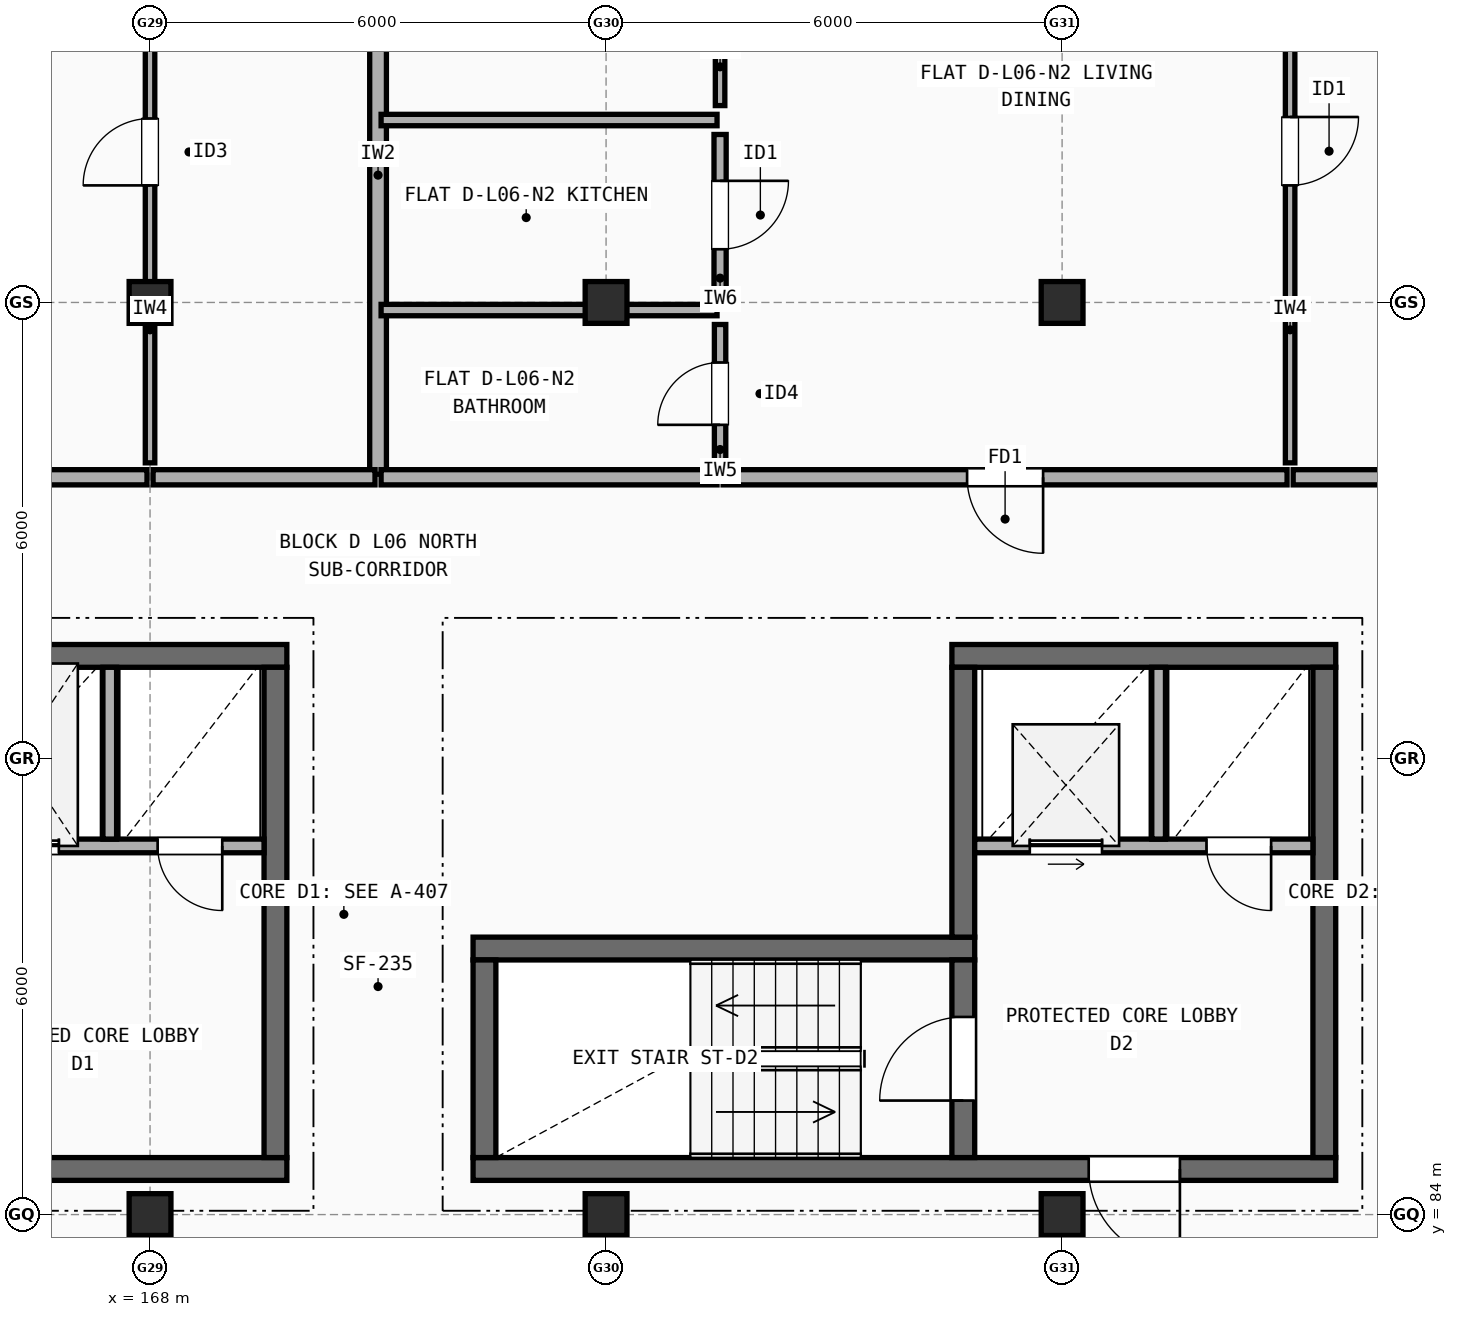
"""IFC4 building model, lengths in metres.
Left out: names, types, materials, properties, quantities, classifications, styles, units other than length and angle.
Written with IfcOpenShell. Run it as: python <this file> out.ifc"""

import sys

from ifc_helpers import new_model, si_unit, direction, frame, frame_2d, origin, origin_2d, place, context, subcontext, project, spatial, rectangle, extrude, element, fill, save


model = new_model("IFC4")
c1 = context("Model", 3, precision=1e-05, world=origin(), true_north=direction((0.0, 1.0)))
c2 = subcontext(c1, "Body", "Model", "MODEL_VIEW")
j1 = project(units=[si_unit("LENGTHUNIT", "METRE"), si_unit("PLANEANGLEUNIT", "RADIAN")], contexts=[c1])
p1 = place(None, origin())
s1 = spatial("IfcSite", under=j1, at=p1, CompositionType="ELEMENT")
p2 = place(p1, origin())
s2 = spatial("IfcBuilding", under=s1, at=p2, CompositionType="ELEMENT")
p3 = place(p2, frame((0.0, 0.0, 20.5)))
s3 = spatial("IfcBuildingStorey", under=s2, at=p3, CompositionType="ELEMENT", Elevation=20.5)
for number, where, z_axis, x_axis in (
    (1, (168.0, 84.0, 0.0), (0.0, 0.0, 1.0), (1.0, 0.0, 0.0)),
    (2, (168.0, 96.0, 0.0), (0.0, 0.0, 1.0), (1.0, 0.0, 0.0)),
    (3, (174.0, 84.0, 0.0), (0.0, 0.0, 1.0), (1.0, 0.0, 0.0)),
    (4, (174.0, 96.0, 0.0), (0.0, 0.0, 1.0), (1.0, 0.0, 0.0)),
    (5, (180.0, 84.0, 0.0), (0.0, 0.0, 1.0), (1.0, 0.0, 0.0)),
    (6, (180.0, 96.0, 0.0), (0.0, 0.0, 1.0), (1.0, 0.0, 0.0)),
):
    element("IfcColumn", number, at=place(p3, frame(where, z_axis=z_axis, x_axis=x_axis)), inside=s3, PredefinedType="COLUMN", context=c2, shape_type="SweptSolid", body=[
        extrude(rectangle(XDim=0.55, YDim=0.55, at=origin_2d()), origin(), (0.0, 0.0, 1.0), 2.97),
    ])
p4 = place(p3, frame((158.45, 84.6, 0.0), z_axis=(0.0, 0.0, 1.0), x_axis=(1.0, 0.0, 0.0)))
e7 = element("IfcWall", 7, at=p4, inside=s3, PredefinedType="SHEAR", context=c2, shape_type="SweptSolid", body=[
    extrude(rectangle(XDim=11.35, YDim=0.3, at=frame_2d((5.675, 0.0))), origin(), (0.0, 0.0, 1.0), 2.97),
])
p5 = place(p4, frame((5.1, 0.0, 0.0)))
e8 = element("IfcOpeningElement", 8, at=p5, cuts=e7, PredefinedType="OPENING", context=c2, shape_type="SweptSolid", body=[
    extrude(rectangle(XDim=1.15, YDim=2.15, at=frame_2d((0.575, 1.075))), frame((0.0, 0.16, 0.0), z_axis=(0.0, -1.0, 0.0), x_axis=(1.0, 0.0, 0.0)), (0.0, 0.0, 1.0), 0.32),
])
p6 = place(p3, frame((169.8, 91.35, 0.0), z_axis=(0.0, 0.0, 1.0), x_axis=(-1.0, 0.0, 0.0)))
e9 = element("IfcWall", 9, at=p6, inside=s3, PredefinedType="SHEAR", context=c2, shape_type="SweptSolid", body=[
    extrude(rectangle(XDim=5.05, YDim=0.3, at=frame_2d((2.525, 0.0))), origin(), (0.0, 0.0, 1.0), 2.97),
])
p7 = place(p3, frame((169.65, 84.75, 0.0), z_axis=(0.0, 0.0, 1.0), x_axis=(0.0, 1.0, 0.0)))
e10 = element("IfcWall", 10, at=p7, inside=s3, PredefinedType="SHEAR", context=c2, shape_type="SweptSolid", body=[
    extrude(rectangle(XDim=6.45, YDim=0.3, at=frame_2d((3.225, 0.0))), origin(), (0.0, 0.0, 1.0), 2.97),
])
p8 = place(p3, frame((165.05, 88.85, 0.0), z_axis=(0.0, 0.0, 1.0), x_axis=(1.0, 0.0, 0.0)))
e11 = element("IfcWall", 11, at=p8, inside=s3, PredefinedType="SOLIDWALL", context=c2, shape_type="SweptSolid", body=[
    extrude(rectangle(XDim=4.45, YDim=0.18, at=frame_2d((2.225, 0.0))), origin(), (0.0, 0.0, 1.0), 2.97),
])
p9 = place(p8, frame((0.65, 0.0, 0.0)))
e12 = element("IfcOpeningElement", 12, at=p9, cuts=e11, PredefinedType="OPENING", context=c2, shape_type="SweptSolid", body=[
    extrude(rectangle(XDim=1.1, YDim=2.15, at=frame_2d((0.55, 1.075))), frame((0.0, 0.1, 0.0), z_axis=(0.0, -1.0, 0.0), x_axis=(1.0, 0.0, 0.0)), (0.0, 0.0, 1.0), 0.2),
])
p10 = place(p8, frame((3.05, 0.0, 0.0)))
e13 = element("IfcOpeningElement", 13, at=p10, cuts=e11, PredefinedType="OPENING", context=c2, shape_type="SweptSolid", body=[
    extrude(rectangle(XDim=0.85, YDim=2.1, at=frame_2d((0.425, 1.05))), frame((0.0, 0.1, 0.0), z_axis=(0.0, -1.0, 0.0), x_axis=(1.0, 0.0, 0.0)), (0.0, 0.0, 1.0), 0.2),
])
p11 = place(p3, frame((167.47, 88.94, 0.0), z_axis=(0.0, 0.0, 1.0), x_axis=(0.0, 1.0, 0.0)))
e14 = element("IfcWall", 14, at=p11, inside=s3, PredefinedType="SOLIDWALL", context=c2, shape_type="SweptSolid", body=[
    extrude(rectangle(XDim=2.26, YDim=0.18, at=frame_2d((1.13, 0.0))), origin(), (0.0, 0.0, 1.0), 2.97),
])
p12 = place(p3, frame((172.25, 84.6, 0.0), z_axis=(0.0, 0.0, 1.0), x_axis=(1.0, 0.0, 0.0)))
e15 = element("IfcWall", 15, at=p12, inside=s3, PredefinedType="SHEAR", context=c2, shape_type="SweptSolid", body=[
    extrude(rectangle(XDim=11.35, YDim=0.3, at=frame_2d((5.675, 0.0))), origin(), (0.0, 0.0, 1.0), 2.97),
])
p13 = place(p12, frame((8.1, 0.0, 0.0)))
e16 = element("IfcOpeningElement", 16, at=p13, cuts=e15, PredefinedType="OPENING", context=c2, shape_type="SweptSolid", body=[
    extrude(rectangle(XDim=1.2, YDim=2.15, at=frame_2d((0.6, 1.075))), frame((0.0, 0.16, 0.0), z_axis=(0.0, -1.0, 0.0), x_axis=(1.0, 0.0, 0.0)), (0.0, 0.0, 1.0), 0.32),
])
p14 = place(p3, frame((178.85, 87.5, 0.0), z_axis=(0.0, 0.0, 1.0), x_axis=(-1.0, 0.0, 0.0)))
e17 = element("IfcWall", 17, at=p14, inside=s3, PredefinedType="SHEAR", context=c2, shape_type="SweptSolid", body=[
    extrude(rectangle(XDim=6.6, YDim=0.3, at=frame_2d((3.3, 0.0))), origin(), (0.0, 0.0, 1.0), 2.97),
])
p15 = place(p3, frame((172.4, 87.35, 0.0), z_axis=(0.0, 0.0, 1.0), x_axis=(0.0, -1.0, 0.0)))
e18 = element("IfcWall", 18, at=p15, inside=s3, PredefinedType="SHEAR", context=c2, shape_type="SweptSolid", body=[
    extrude(rectangle(XDim=2.6, YDim=0.3, at=frame_2d((1.3, 0.0))), origin(), (0.0, 0.0, 1.0), 2.97),
])
p16 = place(p3, frame((178.7, 84.75, 0.0), z_axis=(0.0, 0.0, 1.0), x_axis=(0.0, 1.0, 0.0)))
e19 = element("IfcWall", 19, at=p16, inside=s3, PredefinedType="SHEAR", context=c2, shape_type="SweptSolid", body=[
    extrude(rectangle(XDim=2.6, YDim=0.3, at=frame_2d((1.3, 0.0))), origin(), (0.0, 0.0, 1.0), 2.97),
])
p17 = place(p16, frame((0.75, 0.0, 0.0)))
e20 = element("IfcOpeningElement", 20, at=p17, cuts=e19, PredefinedType="OPENING", context=c2, shape_type="SweptSolid", body=[
    extrude(rectangle(XDim=1.1, YDim=2.15, at=frame_2d((0.55, 1.075))), frame((0.0, 0.16, 0.0), z_axis=(0.0, -1.0, 0.0), x_axis=(1.0, 0.0, 0.0)), (0.0, 0.0, 1.0), 0.32),
])
p18 = place(p3, frame((183.6, 91.35, 0.0), z_axis=(0.0, 0.0, 1.0), x_axis=(-1.0, 0.0, 0.0)))
e21 = element("IfcWall", 21, at=p18, inside=s3, PredefinedType="SHEAR", context=c2, shape_type="SweptSolid", body=[
    extrude(rectangle(XDim=5.05, YDim=0.3, at=frame_2d((2.525, 0.0))), origin(), (0.0, 0.0, 1.0), 2.97),
])
p19 = place(p3, frame((183.45, 84.75, 0.0), z_axis=(0.0, 0.0, 1.0), x_axis=(0.0, 1.0, 0.0)))
e22 = element("IfcWall", 22, at=p19, inside=s3, PredefinedType="SHEAR", context=c2, shape_type="SweptSolid", body=[
    extrude(rectangle(XDim=6.45, YDim=0.3, at=frame_2d((3.225, 0.0))), origin(), (0.0, 0.0, 1.0), 2.97),
])
p20 = place(p3, frame((178.7, 87.65, 0.0), z_axis=(0.0, 0.0, 1.0), x_axis=(0.0, 1.0, 0.0)))
e23 = element("IfcWall", 23, at=p20, inside=s3, PredefinedType="SHEAR", context=c2, shape_type="SweptSolid", body=[
    extrude(rectangle(XDim=3.55, YDim=0.3, at=frame_2d((1.775, 0.0))), origin(), (0.0, 0.0, 1.0), 2.97),
])
p21 = place(p3, frame((178.85, 88.85, 0.0), z_axis=(0.0, 0.0, 1.0), x_axis=(1.0, 0.0, 0.0)))
e24 = element("IfcWall", 24, at=p21, inside=s3, PredefinedType="SOLIDWALL", context=c2, shape_type="SweptSolid", body=[
    extrude(rectangle(XDim=4.45, YDim=0.18, at=frame_2d((2.225, 0.0))), origin(), (0.0, 0.0, 1.0), 2.97),
])
p22 = place(p21, frame((0.725, 0.0, 0.0)))
e25 = element("IfcOpeningElement", 25, at=p22, cuts=e24, PredefinedType="OPENING", context=c2, shape_type="SweptSolid", body=[
    extrude(rectangle(XDim=0.95, YDim=2.15, at=frame_2d((0.475, 1.075))), frame((0.0, 0.1, 0.0), z_axis=(0.0, -1.0, 0.0), x_axis=(1.0, 0.0, 0.0)), (0.0, 0.0, 1.0), 0.2),
])
p23 = place(p21, frame((3.05, 0.0, 0.0)))
e26 = element("IfcOpeningElement", 26, at=p23, cuts=e24, PredefinedType="OPENING", context=c2, shape_type="SweptSolid", body=[
    extrude(rectangle(XDim=0.85, YDim=2.1, at=frame_2d((0.425, 1.05))), frame((0.0, 0.1, 0.0), z_axis=(0.0, -1.0, 0.0), x_axis=(1.0, 0.0, 0.0)), (0.0, 0.0, 1.0), 0.2),
])
p24 = place(p3, frame((181.27, 88.94, 0.0), z_axis=(0.0, 0.0, 1.0), x_axis=(0.0, 1.0, 0.0)))
e27 = element("IfcWall", 27, at=p24, inside=s3, PredefinedType="SOLIDWALL", context=c2, shape_type="SweptSolid", body=[
    extrude(rectangle(XDim=2.26, YDim=0.18, at=frame_2d((1.13, 0.0))), origin(), (0.0, 0.0, 1.0), 2.97),
])
p25 = place(p3, frame((171.0, 93.74, 0.0), z_axis=(0.0, 0.0, 1.0), x_axis=(0.0, 1.0, 0.0)))
e28 = element("IfcWall", 28, at=p25, inside=s3, PredefinedType="SOLIDWALL", context=c2, shape_type="SweptSolid", body=[
    extrude(rectangle(XDim=7.87, YDim=0.22, at=frame_2d((3.935, 0.0))), origin(), (0.0, 0.0, 1.0), 2.508),
])
p26 = place(p3, frame((160.54, 93.7, 0.0), z_axis=(0.0, 0.0, 1.0), x_axis=(1.0, 0.0, 0.0)))
e29 = element("IfcWall", 29, at=p26, inside=s3, PredefinedType="SOLIDWALL", context=c2, shape_type="SweptSolid", body=[
    extrude(rectangle(XDim=7.42, YDim=0.2, at=frame_2d((3.71, 0.0))), origin(), (0.0, 0.0, 1.0), 2.508),
])
p27 = place(p26, frame((3.22, 0.0, 0.0)))
e30 = element("IfcOpeningElement", 30, at=p27, cuts=e29, PredefinedType="OPENING", context=c2, shape_type="SweptSolid", body=[
    extrude(rectangle(XDim=0.98, YDim=2.15, at=frame_2d((0.49, 1.075))), frame((0.0, 0.11, 0.0), z_axis=(0.0, -1.0, 0.0), x_axis=(1.0, 0.0, 0.0)), (0.0, 0.0, 1.0), 0.22),
])
p28 = place(p3, frame((168.04, 93.7, 0.0), z_axis=(0.0, 0.0, 1.0), x_axis=(1.0, 0.0, 0.0)))
e31 = element("IfcWall", 31, at=p28, inside=s3, PredefinedType="SOLIDWALL", context=c2, shape_type="SweptSolid", body=[
    extrude(rectangle(XDim=2.92, YDim=0.2, at=frame_2d((1.46, 0.0))), origin(), (0.0, 0.0, 1.0), 2.508),
])
p29 = place(p3, frame((168.0, 93.89, 0.0), z_axis=(0.0, 0.0, 1.0), x_axis=(0.0, 1.0, 0.0)))
e32 = element("IfcWall", 32, at=p29, inside=s3, PredefinedType="PARTITIONING", context=c2, shape_type="SweptSolid", body=[
    extrude(rectangle(XDim=7.6, YDim=0.125, at=frame_2d((3.8, 0.0))), origin(), (0.0, 0.0, 1.0), 2.508),
])
p30 = place(p29, frame((3.65, 0.0, 0.0)))
e33 = element("IfcOpeningElement", 33, at=p30, cuts=e32, PredefinedType="OPENING", context=c2, shape_type="SweptSolid", body=[
    extrude(rectangle(XDim=0.88, YDim=2.1, at=frame_2d((0.44, 1.05))), frame((0.0, 0.073, 0.0), z_axis=(0.0, -1.0, 0.0), x_axis=(1.0, 0.0, 0.0)), (0.0, 0.0, 1.0), 0.145),
])
p31 = place(p3, frame((171.04, 93.7, 0.0), z_axis=(0.0, 0.0, 1.0), x_axis=(1.0, 0.0, 0.0)))
e34 = element("IfcWall", 34, at=p31, inside=s3, PredefinedType="SOLIDWALL", context=c2, shape_type="SweptSolid", body=[
    extrude(rectangle(XDim=4.42, YDim=0.2, at=frame_2d((2.21, 0.0))), origin(), (0.0, 0.0, 1.0), 2.97),
])
p32 = place(p3, frame((175.54, 93.7, 0.0), z_axis=(0.0, 0.0, 1.0), x_axis=(1.0, 0.0, 0.0)))
e35 = element("IfcWall", 35, at=p32, inside=s3, PredefinedType="SOLIDWALL", context=c2, shape_type="SweptSolid", body=[
    extrude(rectangle(XDim=7.42, YDim=0.2, at=frame_2d((3.71, 0.0))), origin(), (0.0, 0.0, 1.0), 2.97),
])
p33 = place(p32, frame((3.21, 0.0, 0.0)))
e36 = element("IfcOpeningElement", 36, at=p33, cuts=e35, PredefinedType="OPENING", context=c2, shape_type="SweptSolid", body=[
    extrude(rectangle(XDim=1.0, YDim=2.15, at=frame_2d((0.5, 1.075))), frame((0.0, 0.11, 0.0), z_axis=(0.0, -1.0, 0.0), x_axis=(1.0, 0.0, 0.0)), (0.0, 0.0, 1.0), 0.22),
])
p34 = place(p3, frame((175.5, 98.59, 0.0), z_axis=(0.0, 0.0, 1.0), x_axis=(0.0, 1.0, 0.0)))
e37 = element("IfcWall", 37, at=p34, inside=s3, PredefinedType="PARTITIONING", context=c2, shape_type="SweptSolid", body=[
    extrude(rectangle(XDim=3.22, YDim=0.125, at=frame_2d((1.61, 0.0))), origin(), (0.0, 0.0, 1.0), 2.97),
])
p35 = place(p34, frame((1.17, 0.0, 0.0)))
e38 = element("IfcOpeningElement", 38, at=p35, cuts=e37, PredefinedType="OPENING", context=c2, shape_type="SweptSolid", body=[
    extrude(rectangle(XDim=0.88, YDim=2.1, at=frame_2d((0.44, 1.05))), frame((0.0, 0.073, 0.0), z_axis=(0.0, -1.0, 0.0), x_axis=(1.0, 0.0, 0.0)), (0.0, 0.0, 1.0), 0.145),
])
p36 = place(p3, frame((175.5, 96.09, 0.0), z_axis=(0.0, 0.0, 1.0), x_axis=(0.0, 1.0, 0.0)))
e39 = element("IfcWall", 39, at=p36, inside=s3, PredefinedType="PLUMBINGWALL", context=c2, shape_type="SweptSolid", body=[
    extrude(rectangle(XDim=2.12, YDim=0.16, at=frame_2d((1.06, 0.0))), origin(), (0.0, 0.0, 1.0), 2.408),
])
p37 = place(p36, frame((0.61, 0.0, 0.0)))
e40 = element("IfcOpeningElement", 40, at=p37, cuts=e39, PredefinedType="OPENING", context=c2, shape_type="SweptSolid", body=[
    extrude(rectangle(XDim=0.9, YDim=2.1, at=frame_2d((0.45, 1.05))), frame((0.0, 0.09, 0.0), z_axis=(0.0, -1.0, 0.0), x_axis=(1.0, 0.0, 0.0)), (0.0, 0.0, 1.0), 0.18),
])
p38 = place(p3, frame((175.5, 93.89, 0.0), z_axis=(0.0, 0.0, 1.0), x_axis=(0.0, 1.0, 0.0)))
e41 = element("IfcWall", 41, at=p38, inside=s3, PredefinedType="PARTITIONING", context=c2, shape_type="SweptSolid", body=[
    extrude(rectangle(XDim=1.82, YDim=0.15, at=frame_2d((0.91, 0.0))), origin(), (0.0, 0.0, 1.0), 2.97),
])
p39 = place(p38, frame((0.5, 0.0, 0.0)))
e42 = element("IfcOpeningElement", 42, at=p39, cuts=e41, PredefinedType="OPENING", context=c2, shape_type="SweptSolid", body=[
    extrude(rectangle(XDim=0.82, YDim=2.08, at=frame_2d((0.41, 1.04))), frame((0.0, 0.085, 0.0), z_axis=(0.0, -1.0, 0.0), x_axis=(1.0, 0.0, 0.0)), (0.0, 0.0, 1.0), 0.17),
])
p40 = place(p3, frame((171.04, 98.4, 0.0), z_axis=(0.0, 0.0, 1.0), x_axis=(1.0, 0.0, 0.0)))
e43 = element("IfcWall", 43, at=p40, inside=s3, PredefinedType="PARTITIONING", context=c2, shape_type="SweptSolid", body=[
    extrude(rectangle(XDim=4.42, YDim=0.15, at=frame_2d((2.21, 0.0))), origin(), (0.0, 0.0, 1.0), 2.508),
])
p41 = place(p3, frame((171.04, 95.9, 0.0), z_axis=(0.0, 0.0, 1.0), x_axis=(1.0, 0.0, 0.0)))
e44 = element("IfcWall", 44, at=p41, inside=s3, PredefinedType="PARTITIONING", context=c2, shape_type="SweptSolid", body=[
    extrude(rectangle(XDim=4.42, YDim=0.15, at=frame_2d((2.21, 0.0))), origin(), (0.0, 0.0, 1.0), 2.408),
])
p42 = place(p3, frame((183.04, 93.7, 0.0), z_axis=(0.0, 0.0, 1.0), x_axis=(1.0, 0.0, 0.0)))
e45 = element("IfcWall", 45, at=p42, inside=s3, PredefinedType="SOLIDWALL", context=c2, shape_type="SweptSolid", body=[
    extrude(rectangle(XDim=2.92, YDim=0.2, at=frame_2d((1.46, 0.0))), origin(), (0.0, 0.0, 1.0), 2.452),
])
p43 = place(p3, frame((183.0, 93.89, 0.0), z_axis=(0.0, 0.0, 1.0), x_axis=(0.0, 1.0, 0.0)))
e46 = element("IfcWall", 46, at=p43, inside=s3, PredefinedType="PARTITIONING", context=c2, shape_type="SweptSolid", body=[
    extrude(rectangle(XDim=7.92, YDim=0.125, at=frame_2d((3.96, 0.0))), origin(), (0.0, 0.0, 1.0), 2.548),
])
p44 = place(p43, frame((3.65, 0.0, 0.0)))
e47 = element("IfcOpeningElement", 47, at=p44, cuts=e46, PredefinedType="OPENING", context=c2, shape_type="SweptSolid", body=[
    extrude(rectangle(XDim=0.9, YDim=2.1, at=frame_2d((0.45, 1.05))), frame((0.0, 0.073, 0.0), z_axis=(0.0, -1.0, 0.0), x_axis=(1.0, 0.0, 0.0)), (0.0, 0.0, 1.0), 0.145),
])
p45 = place(p9, origin())
e48 = element("IfcDoor", 48, at=p45, inside=s3, OperationType="SLIDING_TO_LEFT", PredefinedType="DOOR", context=c2, shape_type="SweptSolid", body=[
    extrude(rectangle(XDim=1.1, YDim=2.15, at=frame_2d((0.55, 1.075))), frame((0.0, 0.025, 0.0), z_axis=(0.0, -1.0, 0.0), x_axis=(1.0, 0.0, 0.0)), (0.0, 0.0, 1.0), 0.05),
])
fill(e12, e48)
p46 = place(p10, frame((0.85, 0.0, 0.0), z_axis=(0.0, 0.0, 1.0), x_axis=(-1.0, 0.0, 0.0)))
e49 = element("IfcDoor", 49, at=p46, inside=s3, OperationType="SINGLE_SWING_RIGHT", PredefinedType="DOOR", context=c2, shape_type="SweptSolid", body=[
    extrude(rectangle(XDim=0.85, YDim=2.1, at=frame_2d((0.425, 1.05))), frame((0.0, 0.025, 0.0), z_axis=(0.0, -1.0, 0.0), x_axis=(1.0, 0.0, 0.0)), (0.0, 0.0, 1.0), 0.05),
])
fill(e13, e49)
p47 = place(p13, origin())
e50 = element("IfcDoor", 50, at=p47, inside=s3, OperationType="SINGLE_SWING_RIGHT", PredefinedType="DOOR", context=c2, shape_type="SweptSolid", body=[
    extrude(rectangle(XDim=1.2, YDim=2.15, at=frame_2d((0.6, 1.075))), frame((0.0, 0.025, 0.0), z_axis=(0.0, -1.0, 0.0), x_axis=(1.0, 0.0, 0.0)), (0.0, 0.0, 1.0), 0.05),
])
fill(e16, e50)
p48 = place(p17, origin())
e51 = element("IfcDoor", 51, at=p48, inside=s3, OperationType="SINGLE_SWING_LEFT", PredefinedType="DOOR", context=c2, shape_type="SweptSolid", body=[
    extrude(rectangle(XDim=1.1, YDim=2.15, at=frame_2d((0.55, 1.075))), frame((0.0, 0.025, 0.0), z_axis=(0.0, -1.0, 0.0), x_axis=(1.0, 0.0, 0.0)), (0.0, 0.0, 1.0), 0.05),
])
fill(e20, e51)
p49 = place(p22, origin())
e52 = element("IfcDoor", 52, at=p49, inside=s3, OperationType="SLIDING_TO_LEFT", PredefinedType="DOOR", context=c2, shape_type="SweptSolid", body=[
    extrude(rectangle(XDim=0.95, YDim=2.15, at=frame_2d((0.475, 1.075))), frame((0.0, 0.025, 0.0), z_axis=(0.0, -1.0, 0.0), x_axis=(1.0, 0.0, 0.0)), (0.0, 0.0, 1.0), 0.05),
])
fill(e25, e52)
p50 = place(p23, frame((0.85, 0.0, 0.0), z_axis=(0.0, 0.0, 1.0), x_axis=(-1.0, 0.0, 0.0)))
e53 = element("IfcDoor", 53, at=p50, inside=s3, OperationType="SINGLE_SWING_RIGHT", PredefinedType="DOOR", context=c2, shape_type="SweptSolid", body=[
    extrude(rectangle(XDim=0.85, YDim=2.1, at=frame_2d((0.425, 1.05))), frame((0.0, 0.025, 0.0), z_axis=(0.0, -1.0, 0.0), x_axis=(1.0, 0.0, 0.0)), (0.0, 0.0, 1.0), 0.05),
])
fill(e26, e53)
p51 = place(p30, origin())
e54 = element("IfcDoor", 54, at=p51, inside=s3, OperationType="SINGLE_SWING_LEFT", PredefinedType="DOOR", context=c2, shape_type="SweptSolid", body=[
    extrude(rectangle(XDim=0.88, YDim=2.1, at=frame_2d((0.44, 1.05))), frame((0.0, 0.025, 0.0), z_axis=(0.0, -1.0, 0.0), x_axis=(1.0, 0.0, 0.0)), (0.0, 0.0, 1.0), 0.05),
])
fill(e33, e54)
p52 = place(p33, origin())
e55 = element("IfcDoor", 55, at=p52, inside=s3, OperationType="SINGLE_SWING_RIGHT", PredefinedType="DOOR", context=c2, shape_type="SweptSolid", body=[
    extrude(rectangle(XDim=1.0, YDim=2.15, at=frame_2d((0.5, 1.075))), frame((0.0, 0.025, 0.0), z_axis=(0.0, -1.0, 0.0), x_axis=(1.0, 0.0, 0.0)), (0.0, 0.0, 1.0), 0.05),
])
fill(e36, e55)
p53 = place(p37, origin())
e56 = element("IfcDoor", 56, at=p53, inside=s3, OperationType="SINGLE_SWING_RIGHT", PredefinedType="DOOR", context=c2, shape_type="SweptSolid", body=[
    extrude(rectangle(XDim=0.9, YDim=2.1, at=frame_2d((0.45, 1.05))), frame((0.0, 0.025, 0.0), z_axis=(0.0, -1.0, 0.0), x_axis=(1.0, 0.0, 0.0)), (0.0, 0.0, 1.0), 0.05),
])
fill(e40, e56)
p54 = place(p39, origin())
e57 = element("IfcDoor", 57, at=p54, inside=s3, OperationType="SINGLE_SWING_LEFT", PredefinedType="DOOR", context=c2, shape_type="SweptSolid", body=[
    extrude(rectangle(XDim=0.82, YDim=2.08, at=frame_2d((0.41, 1.04))), frame((0.0, 0.025, 0.0), z_axis=(0.0, -1.0, 0.0), x_axis=(1.0, 0.0, 0.0)), (0.0, 0.0, 1.0), 0.05),
])
fill(e42, e57)
p55 = place(p44, origin())
e58 = element("IfcDoor", 58, at=p55, inside=s3, OperationType="SINGLE_SWING_RIGHT", PredefinedType="DOOR", context=c2, shape_type="SweptSolid", body=[
    extrude(rectangle(XDim=0.9, YDim=2.1, at=frame_2d((0.45, 1.05))), frame((0.0, 0.025, 0.0), z_axis=(0.0, -1.0, 0.0), x_axis=(1.0, 0.0, 0.0)), (0.0, 0.0, 1.0), 0.05),
])
fill(e47, e58)
save(model, sys.argv[1])
